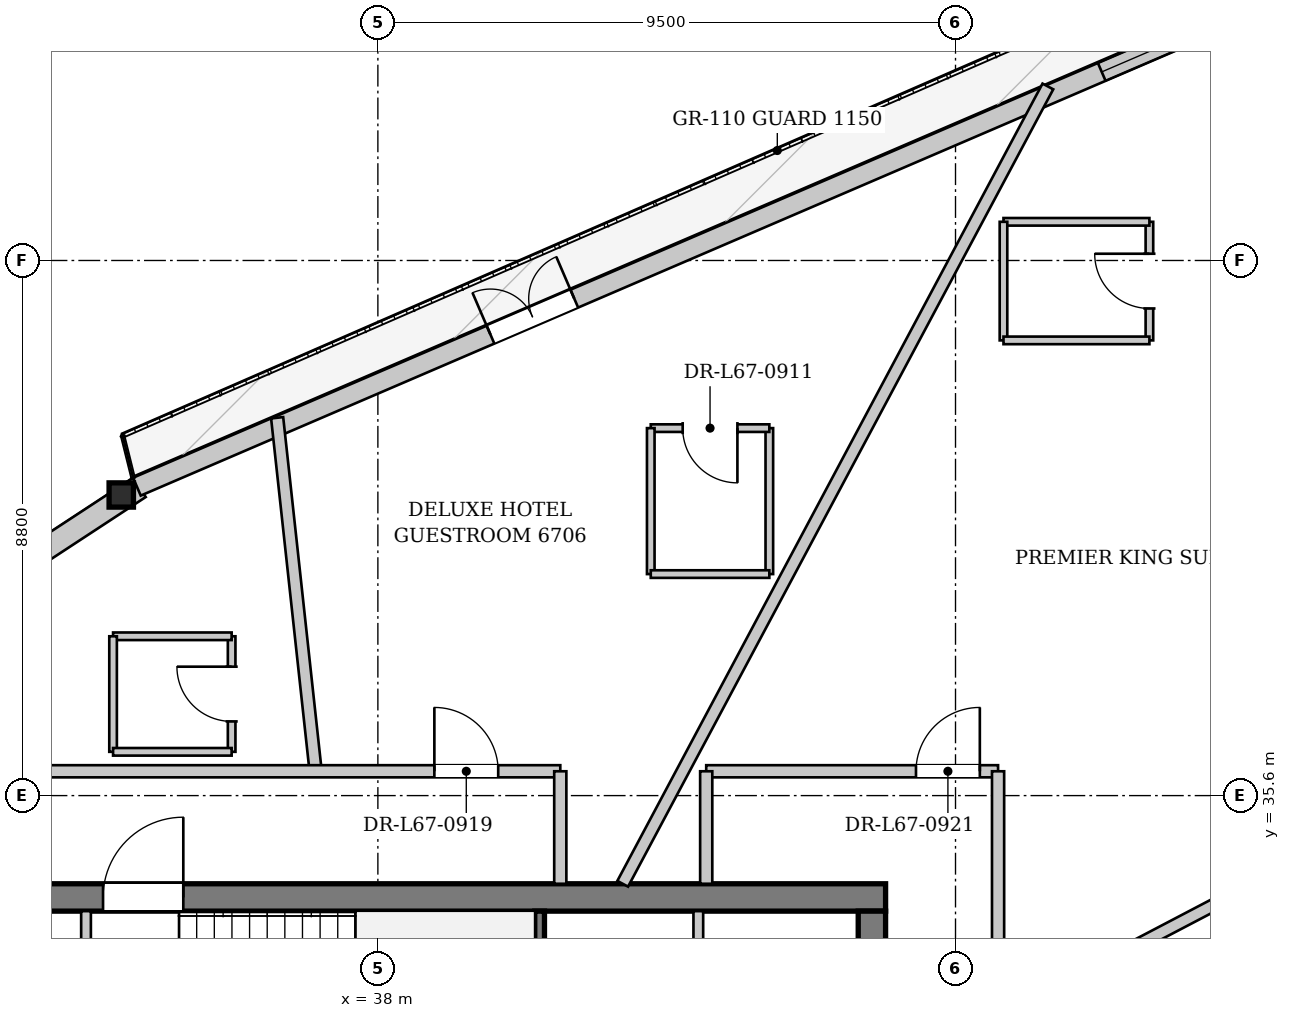
"""IFC4 building model, lengths in metres.
Left out: names, types, materials, properties, quantities, classifications, styles, units other than length and angle.
Written with IfcOpenShell. Run it as: python <this file> out.ifc"""

import sys

from ifc_helpers import new_model, si_unit, direction, frame, frame_2d, origin, origin_2d, place, context, subcontext, project, spatial, rectangle, i_section, extrude, source, transform, mapped, element, fill, save


model = new_model("IFC4")
c1 = context("Model", 3, precision=1e-05, world=origin(), true_north=direction((0.0, 1.0)))
c2 = subcontext(c1, "Body", "Model", "MODEL_VIEW")
j1 = project(units=[si_unit("LENGTHUNIT", "METRE"), si_unit("PLANEANGLEUNIT", "RADIAN")], contexts=[c1])
p1 = place(None, origin())
s1 = spatial("IfcSite", under=j1, at=p1, CompositionType="ELEMENT")
p2 = place(p1, origin())
s2 = spatial("IfcBuilding", under=s1, at=p2, CompositionType="ELEMENT")
p3 = place(p2, frame((0.0, 0.0, 252.5)))
s3 = spatial("IfcBuildingStorey", under=s2, at=p3, CompositionType="ELEMENT", Elevation=252.5)
m1 = source(origin(), c2, "Body", "SweptSolid", [
    extrude(i_section(OverallWidth=0.401, OverallDepth=0.399, WebThickness=0.022, FlangeThickness=0.034, at=origin_2d()), origin(), (0.0, 0.0, 1.0), 3.503),
])
p4 = place(p3, frame((33.973, 40.827, 0.0), z_axis=(-0.110601306067, -0.162034049531, 0.980567344902), x_axis=(0.825934119992, -0.563766644485, 0.0)))
e1 = element("IfcColumn", 1, at=p4, inside=s3, PredefinedType="COLUMN", context=c2, shape_type="MappedRepresentation", body=[
    mapped(m1, transform((0.0, 0.0, 0.0), x_axis=(1.0, 0.0, 0.0), y_axis=(0.0, 1.0, 0.0), z_axis=(0.0, 0.0, 1.0), scale=1.0)),
])
p5 = place(p3, frame((15.575, 28.539, 0.0), z_axis=(0.0, 0.0, 1.0), x_axis=(0.836303758155, 0.5482663806, 0.0)))
e2 = element("IfcWall", 2, at=p5, inside=s3, PredefinedType="SOLIDWALL", context=c2, shape_type="SweptSolid", body=[
    extrude(rectangle(XDim=22.124, YDim=0.38, at=frame_2d((11.062, 0.0))), origin(), (0.0, 0.0, 1.0), 2.872),
])
p6 = place(p5, frame((5.595, 0.0, 0.65)))
e3 = element("IfcOpeningElement", 3, at=p6, cuts=e2, PredefinedType="OPENING", context=c2, shape_type="SweptSolid", body=[
    extrude(rectangle(XDim=1.2, YDim=1.5, at=frame_2d((0.6, 0.75))), frame((0.0, 0.2, 0.0), z_axis=(0.0, -1.0, 0.0), x_axis=(1.0, 0.0, 0.0)), (0.0, 0.0, 1.0), 0.4),
])
p7 = place(p5, frame((16.929, 0.0, 0.65)))
e4 = element("IfcOpeningElement", 4, at=p7, cuts=e2, PredefinedType="OPENING", context=c2, shape_type="SweptSolid", body=[
    extrude(rectangle(XDim=1.2, YDim=1.5, at=frame_2d((0.6, 0.75))), frame((0.0, 0.2, 0.0), z_axis=(0.0, -1.0, 0.0), x_axis=(1.0, 0.0, 0.0)), (0.0, 0.0, 1.0), 0.4),
])
p8 = place(p3, frame((34.037, 40.68, 0.0), z_axis=(0.0, 0.0, 1.0), x_axis=(0.918723841861, 0.394900623444, 0.0)))
e5 = element("IfcWall", 5, at=p8, inside=s3, PredefinedType="SOLIDWALL", context=c2, shape_type="SweptSolid", body=[
    extrude(rectangle(XDim=22.124, YDim=0.32, at=frame_2d((11.062, 0.0))), origin(), (0.0, 0.0, 1.0), 2.872),
])
p9 = place(p8, frame((6.33, 0.0, 0.0)))
e6 = element("IfcOpeningElement", 6, at=p9, cuts=e5, PredefinedType="OPENING", context=c2, shape_type="SweptSolid", body=[
    extrude(rectangle(XDim=1.5, YDim=2.3, at=frame_2d((0.75, 1.15))), frame((0.0, 0.17, 0.0), z_axis=(0.0, -1.0, 0.0), x_axis=(1.0, 0.0, 0.0)), (0.0, 0.0, 1.0), 0.34),
])
p10 = place(p8, frame((17.272, 0.0, 0.402)))
e7 = element("IfcOpeningElement", 7, at=p10, cuts=e5, PredefinedType="OPENING", context=c2, shape_type="SweptSolid", body=[
    extrude(rectangle(XDim=2.6, YDim=2.35, at=frame_2d((1.3, 1.175))), frame((0.0, 0.17, 0.0), z_axis=(0.0, -1.0, 0.0), x_axis=(1.0, 0.0, 0.0)), (0.0, 0.0, 1.0), 0.34),
])
p11 = place(p3, frame((29.65, 33.925, 0.0), z_axis=(0.0, 0.0, 1.0), x_axis=(1.0, 0.0, 0.0)))
e8 = element("IfcWall", 8, at=p11, inside=s3, PredefinedType="SHEAR", context=c2, shape_type="SweptSolid", body=[
    extrude(rectangle(XDim=16.7, YDim=0.45, at=frame_2d((8.35, 0.0))), origin(), (0.0, 0.0, 1.0), 3.38),
])
p12 = place(p11, frame((1.45, 0.0, 0.0)))
e9 = element("IfcOpeningElement", 9, at=p12, cuts=e8, PredefinedType="OPENING", context=c2, shape_type="SweptSolid", body=[
    extrude(rectangle(XDim=0.95, YDim=2.1, at=frame_2d((0.475, 1.05))), frame((0.0, 0.235, 0.0), z_axis=(0.0, -1.0, 0.0), x_axis=(1.0, 0.0, 0.0)), (0.0, 0.0, 1.0), 0.47),
])
p13 = place(p11, frame((3.83, 0.0, 0.0)))
e10 = element("IfcOpeningElement", 10, at=p13, cuts=e8, PredefinedType="OPENING", context=c2, shape_type="SweptSolid", body=[
    extrude(rectangle(XDim=1.32, YDim=2.2, at=frame_2d((0.66, 1.1))), frame((0.0, 0.235, 0.0), z_axis=(0.0, -1.0, 0.0), x_axis=(1.0, 0.0, 0.0)), (0.0, 0.0, 1.0), 0.47),
])
p14 = place(p3, frame((46.125, 33.7, 0.0), z_axis=(0.0, 0.0, 1.0), x_axis=(0.0, -1.0, 0.0)))
e11 = element("IfcWall", 11, at=p14, inside=s3, PredefinedType="SHEAR", context=c2, shape_type="SweptSolid", body=[
    extrude(rectangle(XDim=14.2, YDim=0.45, at=frame_2d((7.1, 0.0))), origin(), (0.0, 0.0, 1.0), 3.38),
])
p15 = place(p14, frame((5.18, 0.0, 0.0)))
e12 = element("IfcOpeningElement", 12, at=p15, cuts=e11, PredefinedType="OPENING", context=c2, shape_type="SweptSolid", body=[
    extrude(rectangle(XDim=1.6, YDim=2.2, at=frame_2d((0.8, 1.1))), frame((0.0, 0.235, 0.0), z_axis=(0.0, -1.0, 0.0), x_axis=(1.0, 0.0, 0.0)), (0.0, 0.0, 1.0), 0.47),
])
p16 = place(p14, frame((2.05, 0.0, 0.0)))
e13 = element("IfcOpeningElement", 13, at=p16, cuts=e11, PredefinedType="OPENING", context=c2, shape_type="SweptSolid", body=[
    extrude(rectangle(XDim=0.95, YDim=2.1, at=frame_2d((0.475, 1.05))), frame((0.0, 0.235, 0.0), z_axis=(0.0, -1.0, 0.0), x_axis=(1.0, 0.0, 0.0)), (0.0, 0.0, 1.0), 0.47),
])
p17 = place(p3, frame((40.66, 30.6, 0.0), z_axis=(0.0, 0.0, 1.0), x_axis=(0.0, 1.0, 0.0)))
e14 = element("IfcWall", 14, at=p17, inside=s3, PredefinedType="PARTITIONING", context=c2, shape_type="SweptSolid", body=[
    extrude(rectangle(XDim=3.1, YDim=0.16, at=frame_2d((1.55, 0.0))), origin(), (0.0, 0.0, 1.0), 3.38),
])
p18 = place(p3, frame((33.2, 28.44, 0.0), z_axis=(0.0, 0.0, 1.0), x_axis=(0.0, 1.0, 0.0)))
e15 = element("IfcWall", 15, at=p18, inside=s3, PredefinedType="PARTITIONING", context=c2, shape_type="SweptSolid", body=[
    extrude(rectangle(XDim=5.26, YDim=0.16, at=frame_2d((2.63, 0.0))), origin(), (0.0, 0.0, 1.0), 3.38),
])
p19 = place(p3, frame((43.27, 30.68, 0.0), z_axis=(0.0, 0.0, 1.0), x_axis=(0.0, 1.0, 0.0)))
e16 = element("IfcWall", 16, at=p19, inside=s3, PredefinedType="PARTITIONING", context=c2, shape_type="SweptSolid", body=[
    extrude(rectangle(XDim=3.02, YDim=0.16, at=frame_2d((1.51, 0.0))), origin(), (0.0, 0.0, 1.0), 3.38),
])
p20 = place(p19, frame((0.95, 0.0, 0.0)))
e17 = element("IfcOpeningElement", 17, at=p20, cuts=e16, PredefinedType="OPENING", context=c2, shape_type="SweptSolid", body=[
    extrude(rectangle(XDim=0.95, YDim=2.1, at=frame_2d((0.475, 1.05))), frame((0.0, 0.09, 0.0), z_axis=(0.0, -1.0, 0.0), x_axis=(1.0, 0.0, 0.0)), (0.0, 0.0, 1.0), 0.18),
])
p21 = place(p3, frame((48.2, 31.942, 0.0), z_axis=(0.0, 0.0, 1.0), x_axis=(0.885861896698, 0.463949027349, 0.0)))
e18 = element("IfcWall", 18, at=p21, inside=s3, PredefinedType="PARTITIONING", context=c2, shape_type="SweptSolid", body=[
    extrude(rectangle(XDim=6.453, YDim=0.2, at=frame_2d((3.226, 0.0))), origin(), (0.0, 0.0, 1.0), 3.38),
])
p22 = place(p3, frame((42.027, 34.15, 0.0), z_axis=(0.0, 0.0, 1.0), x_axis=(0.47056606421, 0.882364765397, 0.0)))
e19 = element("IfcWall", 19, at=p22, inside=s3, PredefinedType="PARTITIONING", context=c2, shape_type="SweptSolid", body=[
    extrude(rectangle(XDim=14.86, YDim=0.2, at=frame_2d((7.43, 0.0))), origin(), (0.0, 0.0, 1.0), 3.38),
])
p23 = place(p3, frame((36.977, 36.0, 0.0), z_axis=(0.0, 0.0, 1.0), x_axis=(-0.10825472155, 0.994123189178, 0.0)))
e20 = element("IfcWall", 20, at=p23, inside=s3, PredefinedType="PARTITIONING", context=c2, shape_type="SweptSolid", body=[
    extrude(rectangle(XDim=5.848, YDim=0.2, at=frame_2d((2.924, 0.0))), origin(), (0.0, 0.0, 1.0), 3.38),
])
p24 = place(p3, frame((50.689, 43.086, 0.0), z_axis=(0.0, 0.0, 1.0), x_axis=(0.0, 1.0, 0.0)))
e21 = element("IfcWall", 21, at=p24, inside=s3, PredefinedType="PARTITIONING", context=c2, shape_type="SweptSolid", body=[
    extrude(rectangle(XDim=1.95, YDim=0.125, at=frame_2d((0.975, 0.0))), origin(), (0.0, 0.0, 1.0), 3.38),
])
p25 = place(p24, frame((0.525, 0.0, 0.0)))
e22 = element("IfcOpeningElement", 22, at=p25, cuts=e21, PredefinedType="OPENING", context=c2, shape_type="SweptSolid", body=[
    extrude(rectangle(XDim=0.9, YDim=2.1, at=frame_2d((0.45, 1.05))), frame((0.0, 0.073, 0.0), z_axis=(0.0, -1.0, 0.0), x_axis=(1.0, 0.0, 0.0)), (0.0, 0.0, 1.0), 0.145),
])
p26 = place(p3, frame((50.689, 45.036, 0.0), z_axis=(0.0, 0.0, 1.0), x_axis=(-1.0, 0.0, 0.0)))
e23 = element("IfcWall", 23, at=p26, inside=s3, PredefinedType="PARTITIONING", context=c2, shape_type="SweptSolid", body=[
    extrude(rectangle(XDim=2.4, YDim=0.125, at=frame_2d((1.2, 0.0))), origin(), (0.0, 0.0, 1.0), 3.38),
])
p27 = place(p3, frame((48.289, 45.036, 0.0), z_axis=(0.0, 0.0, 1.0), x_axis=(0.0, -1.0, 0.0)))
e24 = element("IfcWall", 24, at=p27, inside=s3, PredefinedType="PARTITIONING", context=c2, shape_type="SweptSolid", body=[
    extrude(rectangle(XDim=1.95, YDim=0.125, at=frame_2d((0.975, 0.0))), origin(), (0.0, 0.0, 1.0), 3.38),
])
p28 = place(p3, frame((48.289, 43.086, 0.0), z_axis=(0.0, 0.0, 1.0), x_axis=(1.0, 0.0, 0.0)))
e25 = element("IfcWall", 25, at=p28, inside=s3, PredefinedType="PARTITIONING", context=c2, shape_type="SweptSolid", body=[
    extrude(rectangle(XDim=2.4, YDim=0.125, at=frame_2d((1.2, 0.0))), origin(), (0.0, 0.0, 1.0), 3.125),
])
p29 = place(p3, frame((44.438, 39.243, 0.0), z_axis=(0.0, 0.0, 1.0), x_axis=(0.0, 1.0, 0.0)))
e26 = element("IfcWall", 26, at=p29, inside=s3, PredefinedType="PARTITIONING", context=c2, shape_type="SweptSolid", body=[
    extrude(rectangle(XDim=2.4, YDim=0.125, at=frame_2d((1.2, 0.0))), origin(), (0.0, 0.0, 1.0), 3.38),
])
p30 = place(p3, frame((44.438, 41.643, 0.0), z_axis=(0.0, 0.0, 1.0), x_axis=(-1.0, 0.0, 0.0)))
e27 = element("IfcWall", 27, at=p30, inside=s3, PredefinedType="PARTITIONING", context=c2, shape_type="SweptSolid", body=[
    extrude(rectangle(XDim=1.95, YDim=0.125, at=frame_2d((0.975, 0.0))), origin(), (0.0, 0.0, 1.0), 3.125),
])
p31 = place(p30, frame((0.525, 0.0, 0.0)))
e28 = element("IfcOpeningElement", 28, at=p31, cuts=e27, PredefinedType="OPENING", context=c2, shape_type="SweptSolid", body=[
    extrude(rectangle(XDim=0.9, YDim=2.1, at=frame_2d((0.45, 1.05))), frame((0.0, 0.073, 0.0), z_axis=(0.0, -1.0, 0.0), x_axis=(1.0, 0.0, 0.0)), (0.0, 0.0, 1.0), 0.145),
])
p32 = place(p3, frame((42.488, 41.643, 0.0), z_axis=(0.0, 0.0, 1.0), x_axis=(0.0, -1.0, 0.0)))
e29 = element("IfcWall", 29, at=p32, inside=s3, PredefinedType="PARTITIONING", context=c2, shape_type="SweptSolid", body=[
    extrude(rectangle(XDim=2.4, YDim=0.125, at=frame_2d((1.2, 0.0))), origin(), (0.0, 0.0, 1.0), 3.38),
])
p33 = place(p3, frame((42.488, 39.243, 0.0), z_axis=(0.0, 0.0, 1.0), x_axis=(1.0, 0.0, 0.0)))
e30 = element("IfcWall", 30, at=p33, inside=s3, PredefinedType="PARTITIONING", context=c2, shape_type="SweptSolid", body=[
    extrude(rectangle(XDim=1.95, YDim=0.125, at=frame_2d((0.975, 0.0))), origin(), (0.0, 0.0, 1.0), 3.38),
])
p34 = place(p3, frame((35.595, 36.32, 0.0), z_axis=(0.0, 0.0, 1.0), x_axis=(0.0, 1.0, 0.0)))
e31 = element("IfcWall", 31, at=p34, inside=s3, PredefinedType="PARTITIONING", context=c2, shape_type="SweptSolid", body=[
    extrude(rectangle(XDim=1.9, YDim=0.125, at=frame_2d((0.95, 0.0))), origin(), (0.0, 0.0, 1.0), 3.38),
])
p35 = place(p34, frame((0.5, 0.0, 0.0)))
e32 = element("IfcOpeningElement", 32, at=p35, cuts=e31, PredefinedType="OPENING", context=c2, shape_type="SweptSolid", body=[
    extrude(rectangle(XDim=0.9, YDim=2.1, at=frame_2d((0.45, 1.05))), frame((0.0, 0.073, 0.0), z_axis=(0.0, -1.0, 0.0), x_axis=(1.0, 0.0, 0.0)), (0.0, 0.0, 1.0), 0.145),
])
p36 = place(p3, frame((35.595, 38.22, 0.0), z_axis=(0.0, 0.0, 1.0), x_axis=(-1.0, 0.0, 0.0)))
e33 = element("IfcWall", 33, at=p36, inside=s3, PredefinedType="PARTITIONING", context=c2, shape_type="SweptSolid", body=[
    extrude(rectangle(XDim=1.95, YDim=0.125, at=frame_2d((0.975, 0.0))), origin(), (0.0, 0.0, 1.0), 3.125),
])
p37 = place(p3, frame((33.645, 38.22, 0.0), z_axis=(0.0, 0.0, 1.0), x_axis=(0.0, -1.0, 0.0)))
e34 = element("IfcWall", 34, at=p37, inside=s3, PredefinedType="PARTITIONING", context=c2, shape_type="SweptSolid", body=[
    extrude(rectangle(XDim=1.9, YDim=0.125, at=frame_2d((0.95, 0.0))), origin(), (0.0, 0.0, 1.0), 3.38),
])
p38 = place(p3, frame((33.645, 36.32, 0.0), z_axis=(0.0, 0.0, 1.0), x_axis=(1.0, 0.0, 0.0)))
e35 = element("IfcWall", 35, at=p38, inside=s3, PredefinedType="PARTITIONING", context=c2, shape_type="SweptSolid", body=[
    extrude(rectangle(XDim=1.95, YDim=0.125, at=frame_2d((0.975, 0.0))), origin(), (0.0, 0.0, 1.0), 3.38),
])
p39 = place(p3, frame((27.8, 36.0, 0.0), z_axis=(0.0, 0.0, 1.0), x_axis=(1.0, 0.0, 0.0)))
e36 = element("IfcWall", 36, at=p39, inside=s3, PredefinedType="PARTITIONING", context=c2, shape_type="SweptSolid", body=[
    extrude(rectangle(XDim=13.2, YDim=0.2, at=frame_2d((6.6, 0.0))), origin(), (0.0, 0.0, 1.0), 3.38),
])
p40 = place(p39, frame((11.129, 0.0, 0.0)))
e37 = element("IfcOpeningElement", 37, at=p40, cuts=e36, PredefinedType="OPENING", context=c2, shape_type="SweptSolid", body=[
    extrude(rectangle(XDim=1.05, YDim=2.2, at=frame_2d((0.525, 1.1))), frame((0.0, 0.11, 0.0), z_axis=(0.0, -1.0, 0.0), x_axis=(1.0, 0.0, 0.0)), (0.0, 0.0, 1.0), 0.22),
])
p41 = place(p39, frame((3.396, 0.0, 0.0)))
e38 = element("IfcOpeningElement", 38, at=p41, cuts=e36, PredefinedType="OPENING", context=c2, shape_type="SweptSolid", body=[
    extrude(rectangle(XDim=1.05, YDim=2.2, at=frame_2d((0.525, 1.1))), frame((0.0, 0.11, 0.0), z_axis=(0.0, -1.0, 0.0), x_axis=(1.0, 0.0, 0.0)), (0.0, 0.0, 1.0), 0.22),
])
p42 = place(p3, frame((41.0, 34.15, 0.0), z_axis=(0.0, 0.0, 1.0), x_axis=(0.0, 1.0, 0.0)))
e39 = element("IfcWall", 39, at=p42, inside=s3, PredefinedType="PARTITIONING", context=c2, shape_type="SweptSolid", body=[
    extrude(rectangle(XDim=1.85, YDim=0.2, at=frame_2d((0.925, 0.0))), origin(), (0.0, 0.0, 1.0), 3.38),
])
p43 = place(p3, frame((43.4, 36.0, 0.0), z_axis=(0.0, 0.0, 1.0), x_axis=(1.0, 0.0, 0.0)))
e40 = element("IfcWall", 40, at=p43, inside=s3, PredefinedType="PARTITIONING", context=c2, shape_type="SweptSolid", body=[
    extrude(rectangle(XDim=4.8, YDim=0.2, at=frame_2d((2.4, 0.0))), origin(), (0.0, 0.0, 1.0), 3.38),
])
p44 = place(p43, frame((3.45, 0.0, 0.0)))
e41 = element("IfcOpeningElement", 41, at=p44, cuts=e40, PredefinedType="OPENING", context=c2, shape_type="SweptSolid", body=[
    extrude(rectangle(XDim=1.05, YDim=2.2, at=frame_2d((0.525, 1.1))), frame((0.0, 0.11, 0.0), z_axis=(0.0, -1.0, 0.0), x_axis=(1.0, 0.0, 0.0)), (0.0, 0.0, 1.0), 0.22),
])
p45 = place(p3, frame((43.4, 34.15, 0.0), z_axis=(0.0, 0.0, 1.0), x_axis=(0.0, 1.0, 0.0)))
e42 = element("IfcWall", 42, at=p45, inside=s3, PredefinedType="PARTITIONING", context=c2, shape_type="SweptSolid", body=[
    extrude(rectangle(XDim=1.85, YDim=0.2, at=frame_2d((0.925, 0.0))), origin(), (0.0, 0.0, 1.0), 3.38),
])
p46 = place(p3, frame((48.2, 17.2, 0.0), z_axis=(0.0, 0.0, 1.0), x_axis=(0.0, 1.0, 0.0)))
e43 = element("IfcWall", 43, at=p46, inside=s3, PredefinedType="PARTITIONING", context=c2, shape_type="SweptSolid", body=[
    extrude(rectangle(XDim=18.8, YDim=0.2, at=frame_2d((9.4, 0.0))), origin(), (0.0, 0.0, 1.0), 3.065),
])
p47 = place(p46, frame((3.607, 0.0, 0.0)))
e44 = element("IfcOpeningElement", 44, at=p47, cuts=e43, PredefinedType="OPENING", context=c2, shape_type="SweptSolid", body=[
    extrude(rectangle(XDim=1.05, YDim=2.2, at=frame_2d((0.525, 1.1))), frame((0.0, 0.11, 0.0), z_axis=(0.0, -1.0, 0.0), x_axis=(1.0, 0.0, 0.0)), (0.0, 0.0, 1.0), 0.22),
])
p48 = place(p46, frame((10.359, 0.0, 0.0)))
e45 = element("IfcOpeningElement", 45, at=p48, cuts=e43, PredefinedType="OPENING", context=c2, shape_type="SweptSolid", body=[
    extrude(rectangle(XDim=1.05, YDim=2.2, at=frame_2d((0.525, 1.1))), frame((0.0, 0.11, 0.0), z_axis=(0.0, -1.0, 0.0), x_axis=(1.0, 0.0, 0.0)), (0.0, 0.0, 1.0), 0.22),
])
m2 = source(origin(), c2, "Body", "SweptSolid", [
    extrude(rectangle(XDim=1.5, YDim=2.3, at=frame_2d((0.75, 1.15))), frame((0.0, 0.025, 0.0), z_axis=(0.0, -1.0, 0.0), x_axis=(1.0, 0.0, 0.0)), (0.0, 0.0, 1.0), 0.05),
])
p49 = place(p9, origin())
e46 = element("IfcDoor", 46, at=p49, inside=s3, OperationType="DOUBLE_DOOR_SINGLE_SWING", PredefinedType="DOOR", context=c2, shape_type="MappedRepresentation", body=[
    mapped(m2, transform((0.0, 0.0, 0.0), x_axis=(1.0, 0.0, 0.0), y_axis=(0.0, 1.0, 0.0), z_axis=(0.0, 0.0, 1.0), scale=1.0)),
])
fill(e6, e46)
m3 = source(origin(), c2, "Body", "SweptSolid", [
    extrude(rectangle(XDim=2.6, YDim=2.35, at=frame_2d((1.3, 1.175))), frame((0.0, 0.03, 0.0), z_axis=(0.0, -1.0, 0.0), x_axis=(1.0, 0.0, 0.0)), (0.0, 0.0, 1.0), 0.06),
])
p50 = place(p10, origin())
e47 = element("IfcWindow", 47, at=p50, inside=s3, PartitioningType="SINGLE_PANEL", PredefinedType="WINDOW", context=c2, shape_type="MappedRepresentation", body=[
    mapped(m3, transform((0.0, 0.0, 0.0), x_axis=(1.0, 0.0, 0.0), y_axis=(0.0, 1.0, 0.0), z_axis=(0.0, 0.0, 1.0), scale=1.0)),
])
fill(e7, e47)
m4 = source(origin(), c2, "Body", "SweptSolid", [
    extrude(rectangle(XDim=1.32, YDim=2.2, at=frame_2d((0.66, 1.1))), frame((0.0, 0.025, 0.0), z_axis=(0.0, -1.0, 0.0), x_axis=(1.0, 0.0, 0.0)), (0.0, 0.0, 1.0), 0.05),
])
p51 = place(p13, origin())
e48 = element("IfcDoor", 48, at=p51, inside=s3, OperationType="SINGLE_SWING_RIGHT", PredefinedType="DOOR", context=c2, shape_type="MappedRepresentation", body=[
    mapped(m4, transform((0.0, 0.0, 0.0), x_axis=(1.0, 0.0, 0.0), y_axis=(0.0, 1.0, 0.0), z_axis=(0.0, 0.0, 1.0), scale=1.0)),
])
fill(e10, e48)
m5 = source(origin(), c2, "Body", "SweptSolid", [
    extrude(rectangle(XDim=0.9, YDim=2.1, at=frame_2d((0.45, 1.05))), frame((0.0, 0.025, 0.0), z_axis=(0.0, -1.0, 0.0), x_axis=(1.0, 0.0, 0.0)), (0.0, 0.0, 1.0), 0.05),
])
p52 = place(p25, origin())
e49 = element("IfcDoor", 49, at=p52, inside=s3, OperationType="SINGLE_SWING_RIGHT", PredefinedType="DOOR", context=c2, shape_type="MappedRepresentation", body=[
    mapped(m5, transform((0.0, 0.0, 0.0), x_axis=(1.0, 0.0, 0.0), y_axis=(0.0, 1.0, 0.0), z_axis=(0.0, 0.0, 1.0), scale=1.0)),
])
fill(e22, e49)
p53 = place(p31, origin())
e50 = element("IfcDoor", 50, at=p53, inside=s3, OperationType="SINGLE_SWING_LEFT", PredefinedType="DOOR", context=c2, shape_type="MappedRepresentation", body=[
    mapped(m5, transform((0.0, 0.0, 0.0), x_axis=(1.0, 0.0, 0.0), y_axis=(0.0, 1.0, 0.0), z_axis=(0.0, 0.0, 1.0), scale=1.0)),
])
fill(e28, e50)
p54 = place(p35, origin())
e51 = element("IfcDoor", 51, at=p54, inside=s3, OperationType="SINGLE_SWING_RIGHT", PredefinedType="DOOR", context=c2, shape_type="MappedRepresentation", body=[
    mapped(m5, transform((0.0, 0.0, 0.0), x_axis=(1.0, 0.0, 0.0), y_axis=(0.0, 1.0, 0.0), z_axis=(0.0, 0.0, 1.0), scale=1.0)),
])
fill(e32, e51)
m6 = source(origin(), c2, "Body", "SweptSolid", [
    extrude(rectangle(XDim=1.05, YDim=2.2, at=frame_2d((0.525, 1.1))), frame((0.0, 0.025, 0.0), z_axis=(0.0, -1.0, 0.0), x_axis=(1.0, 0.0, 0.0)), (0.0, 0.0, 1.0), 0.05),
])
p55 = place(p40, origin())
e52 = element("IfcDoor", 52, at=p55, inside=s3, OperationType="SINGLE_SWING_LEFT", PredefinedType="DOOR", context=c2, shape_type="MappedRepresentation", body=[
    mapped(m6, transform((0.0, 0.0, 0.0), x_axis=(1.0, 0.0, 0.0), y_axis=(0.0, 1.0, 0.0), z_axis=(0.0, 0.0, 1.0), scale=1.0)),
])
fill(e37, e52)
p56 = place(p44, origin())
e53 = element("IfcDoor", 53, at=p56, inside=s3, OperationType="SINGLE_SWING_RIGHT", PredefinedType="DOOR", context=c2, shape_type="MappedRepresentation", body=[
    mapped(m6, transform((0.0, 0.0, 0.0), x_axis=(1.0, 0.0, 0.0), y_axis=(0.0, 1.0, 0.0), z_axis=(0.0, 0.0, 1.0), scale=1.0)),
])
fill(e41, e53)
save(model, sys.argv[1])
